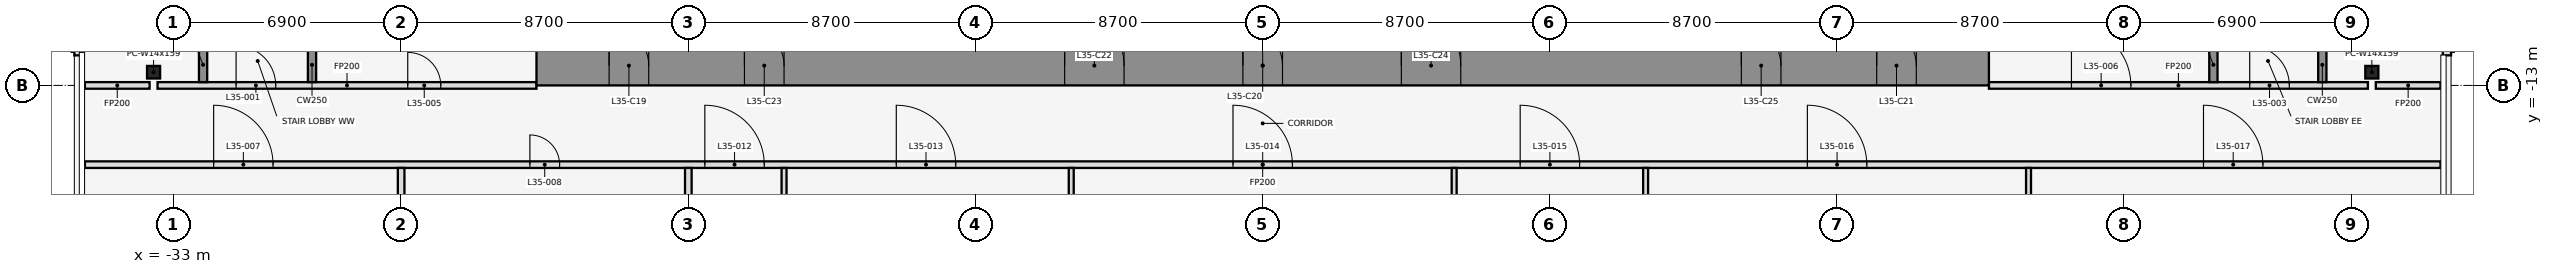
"""IFC4 building model, lengths in metres.
Left out: names, types, materials, properties, quantities, classifications, styles, units other than length and angle.
Written with IfcOpenShell. Run it as: python <this file> out.ifc"""

import sys

from ifc_helpers import new_model, si_unit, direction, frame, frame_2d, origin, origin_2d, place, context, subcontext, project, spatial, rectangle, i_section, extrude, element, fill, save


model = new_model("IFC4")
c1 = context("Model", 3, precision=1e-05, world=origin(), true_north=direction((0.0, 1.0)))
c2 = subcontext(c1, "Body", "Model", "MODEL_VIEW")
j1 = project(units=[si_unit("LENGTHUNIT", "METRE"), si_unit("PLANEANGLEUNIT", "RADIAN")], contexts=[c1])
p1 = place(None, origin())
s1 = spatial("IfcSite", under=j1, at=p1, CompositionType="ELEMENT")
p2 = place(p1, origin())
s2 = spatial("IfcBuilding", under=s1, at=p2, CompositionType="ELEMENT")
p3 = place(p2, frame((0.0, 0.0, 160.9)))
s3 = spatial("IfcBuildingStorey", under=s2, at=p3, CompositionType="ELEMENT", Elevation=160.9)
for number, where, z_axis, x_axis in (
    (1, (-33.6, -12.6, 0.0), (0.0, 0.0, 1.0), (1.0, 0.0, 0.0)),
    (2, (33.6, -12.6, 0.0), (0.0, 0.0, 1.0), (1.0, 0.0, 0.0)),
):
    element("IfcColumn", number, at=place(p3, frame(where, z_axis=z_axis, x_axis=x_axis)), inside=s3, PredefinedType="COLUMN", context=c2, shape_type="SweptSolid", body=[
        extrude(i_section(OverallWidth=0.396, OverallDepth=0.381, WebThickness=0.019, FlangeThickness=0.03, at=origin_2d()), origin(), (0.0, 0.0, 1.0), 4.1),
    ])
for number, where, z_axis, x_axis in (
    (3, (-35.875, -3.0, 0.0), (0.0, 0.0, 1.0), (0.0, -1.0, 0.0)),
    (4, (35.875, -12.09, 0.0), (0.0, 0.0, 1.0), (0.0, 1.0, 0.0)),
):
    element("IfcWall", number, at=place(p3, frame(where, z_axis=z_axis, x_axis=x_axis)), inside=s3, PredefinedType="STANDARD", context=c2, shape_type="SweptSolid", body=[
        extrude(rectangle(XDim=9.09, YDim=0.25, at=frame_2d((4.545, 0.0))), origin(), (0.0, 0.0, 1.0), 3.95),
    ])
p4 = place(p3, frame((-35.68, -15.4, 0.0), z_axis=(0.0, 0.0, 1.0), x_axis=(1.0, 0.0, 0.0)))
e5 = element("IfcWall", 5, at=p4, inside=s3, PredefinedType="PARTITIONING", context=c2, shape_type="SweptSolid", body=[
    extrude(rectangle(XDim=71.36, YDim=0.2, at=frame_2d((35.68, 0.0))), origin(), (0.0, 0.0, 1.0), 2.841),
])
p5 = place(p4, frame((3.9, 0.0, 0.0)))
e6 = element("IfcOpeningElement", 6, at=p5, cuts=e5, PredefinedType="OPENING", context=c2, shape_type="SweptSolid", body=[
    extrude(rectangle(XDim=1.8, YDim=2.1, at=frame_2d((0.9, 1.05))), frame((0.0, 0.112, 0.0), z_axis=(0.0, -1.0, 0.0), x_axis=(1.0, 0.0, 0.0)), (0.0, 0.0, 1.0), 0.224),
])
p6 = place(p4, frame((13.48, 0.0, 0.0)))
e7 = element("IfcOpeningElement", 7, at=p6, cuts=e5, PredefinedType="OPENING", context=c2, shape_type="SweptSolid", body=[
    extrude(rectangle(XDim=0.9, YDim=2.1, at=frame_2d((0.45, 1.05))), frame((0.0, 0.112, 0.0), z_axis=(0.0, -1.0, 0.0), x_axis=(1.0, 0.0, 0.0)), (0.0, 0.0, 1.0), 0.224),
])
p7 = place(p4, frame((18.78, 0.0, 0.0)))
e8 = element("IfcOpeningElement", 8, at=p7, cuts=e5, PredefinedType="OPENING", context=c2, shape_type="SweptSolid", body=[
    extrude(rectangle(XDim=1.8, YDim=2.1, at=frame_2d((0.9, 1.05))), frame((0.0, 0.112, 0.0), z_axis=(0.0, -1.0, 0.0), x_axis=(1.0, 0.0, 0.0)), (0.0, 0.0, 1.0), 0.224),
])
p8 = place(p4, frame((24.58, 0.0, 0.0)))
e9 = element("IfcOpeningElement", 9, at=p8, cuts=e5, PredefinedType="OPENING", context=c2, shape_type="SweptSolid", body=[
    extrude(rectangle(XDim=1.8, YDim=2.1, at=frame_2d((0.9, 1.05))), frame((0.0, 0.112, 0.0), z_axis=(0.0, -1.0, 0.0), x_axis=(1.0, 0.0, 0.0)), (0.0, 0.0, 1.0), 0.224),
])
p9 = place(p4, frame((34.78, 0.0, 0.0)))
e10 = element("IfcOpeningElement", 10, at=p9, cuts=e5, PredefinedType="OPENING", context=c2, shape_type="SweptSolid", body=[
    extrude(rectangle(XDim=1.8, YDim=2.1, at=frame_2d((0.9, 1.05))), frame((0.0, 0.112, 0.0), z_axis=(0.0, -1.0, 0.0), x_axis=(1.0, 0.0, 0.0)), (0.0, 0.0, 1.0), 0.224),
])
p10 = place(p4, frame((43.48, 0.0, 0.0)))
e11 = element("IfcOpeningElement", 11, at=p10, cuts=e5, PredefinedType="OPENING", context=c2, shape_type="SweptSolid", body=[
    extrude(rectangle(XDim=1.8, YDim=2.1, at=frame_2d((0.9, 1.05))), frame((0.0, 0.112, 0.0), z_axis=(0.0, -1.0, 0.0), x_axis=(1.0, 0.0, 0.0)), (0.0, 0.0, 1.0), 0.224),
])
p11 = place(p4, frame((52.18, 0.0, 0.0)))
e12 = element("IfcOpeningElement", 12, at=p11, cuts=e5, PredefinedType="OPENING", context=c2, shape_type="SweptSolid", body=[
    extrude(rectangle(XDim=1.8, YDim=2.1, at=frame_2d((0.9, 1.05))), frame((0.0, 0.112, 0.0), z_axis=(0.0, -1.0, 0.0), x_axis=(1.0, 0.0, 0.0)), (0.0, 0.0, 1.0), 0.224),
])
p12 = place(p4, frame((64.18, 0.0, 0.0)))
e13 = element("IfcOpeningElement", 13, at=p12, cuts=e5, PredefinedType="OPENING", context=c2, shape_type="SweptSolid", body=[
    extrude(rectangle(XDim=1.8, YDim=2.1, at=frame_2d((0.9, 1.05))), frame((0.0, 0.112, 0.0), z_axis=(0.0, -1.0, 0.0), x_axis=(1.0, 0.0, 0.0)), (0.0, 0.0, 1.0), 0.224),
])
p13 = place(p3, frame((-35.68, -13.0, 0.0), z_axis=(0.0, 0.0, 1.0), x_axis=(1.0, 0.0, 0.0)))
e14 = element("IfcWall", 14, at=p13, inside=s3, PredefinedType="PARTITIONING", context=c2, shape_type="SweptSolid", body=[
    extrude(rectangle(XDim=1.96, YDim=0.2, at=frame_2d((0.98, 0.0))), origin(), (0.0, 0.0, 1.0), 2.841),
])
p14 = place(p3, frame((-33.48, -13.0, 0.0), z_axis=(0.0, 0.0, 1.0), x_axis=(1.0, 0.0, 0.0)))
e15 = element("IfcWall", 15, at=p14, inside=s3, PredefinedType="PARTITIONING", context=c2, shape_type="SweptSolid", body=[
    extrude(rectangle(XDim=11.48, YDim=0.2, at=frame_2d((5.74, 0.0))), origin(), (0.0, 0.0, 1.0), 2.841),
])
p15 = place(p14, frame((2.38, 0.0, 0.0)))
e16 = element("IfcOpeningElement", 16, at=p15, cuts=e15, PredefinedType="OPENING", context=c2, shape_type="SweptSolid", body=[
    extrude(rectangle(XDim=1.2, YDim=2.1, at=frame_2d((0.6, 1.05))), frame((0.0, 0.112, 0.0), z_axis=(0.0, -1.0, 0.0), x_axis=(1.0, 0.0, 0.0)), (0.0, 0.0, 1.0), 0.224),
])
p16 = place(p14, frame((7.58, 0.0, 0.0)))
e17 = element("IfcOpeningElement", 17, at=p16, cuts=e15, PredefinedType="OPENING", context=c2, shape_type="SweptSolid", body=[
    extrude(rectangle(XDim=1.0, YDim=2.1, at=frame_2d((0.5, 1.05))), frame((0.0, 0.112, 0.0), z_axis=(0.0, -1.0, 0.0), x_axis=(1.0, 0.0, 0.0)), (0.0, 0.0, 1.0), 0.224),
])
p17 = place(p3, frame((22.0, -13.0, 0.0), z_axis=(0.0, 0.0, 1.0), x_axis=(1.0, 0.0, 0.0)))
e18 = element("IfcWall", 18, at=p17, inside=s3, PredefinedType="PARTITIONING", context=c2, shape_type="SweptSolid", body=[
    extrude(rectangle(XDim=11.48, YDim=0.2, at=frame_2d((5.74, 0.0))), origin(), (0.0, 0.0, 1.0), 2.841),
])
p18 = place(p17, frame((7.9, 0.0, 0.0)))
e19 = element("IfcOpeningElement", 19, at=p18, cuts=e18, PredefinedType="OPENING", context=c2, shape_type="SweptSolid", body=[
    extrude(rectangle(XDim=1.2, YDim=2.1, at=frame_2d((0.6, 1.05))), frame((0.0, 0.112, 0.0), z_axis=(0.0, -1.0, 0.0), x_axis=(1.0, 0.0, 0.0)), (0.0, 0.0, 1.0), 0.224),
])
p19 = place(p17, frame((2.5, 0.0, 0.0)))
e20 = element("IfcOpeningElement", 20, at=p19, cuts=e18, PredefinedType="OPENING", context=c2, shape_type="SweptSolid", body=[
    extrude(rectangle(XDim=1.8, YDim=2.1, at=frame_2d((0.9, 1.05))), frame((0.0, 0.112, 0.0), z_axis=(0.0, -1.0, 0.0), x_axis=(1.0, 0.0, 0.0)), (0.0, 0.0, 1.0), 0.224),
])
p20 = place(p3, frame((33.72, -13.0, 0.0), z_axis=(0.0, 0.0, 1.0), x_axis=(1.0, 0.0, 0.0)))
e21 = element("IfcWall", 21, at=p20, inside=s3, PredefinedType="PARTITIONING", context=c2, shape_type="SweptSolid", body=[
    extrude(rectangle(XDim=1.96, YDim=0.2, at=frame_2d((0.98, 0.0))), origin(), (0.0, 0.0, 1.0), 2.841),
])
for number, where, z_axis, x_axis in (
    (22, (-32.1, -12.9, 0.0), (0.0, 0.0, 1.0), (0.0, 1.0, 0.0)),
    (23, (-28.8, -12.9, 0.0), (0.0, 0.0, 1.0), (0.0, 1.0, 0.0)),
):
    element("IfcWall", number, at=place(p3, frame(where, z_axis=z_axis, x_axis=x_axis)), inside=s3, PredefinedType="SHEAR", context=c2, shape_type="SweptSolid", body=[
        extrude(rectangle(XDim=1.05, YDim=0.25, at=frame_2d((0.525, 0.0))), origin(), (0.0, 0.0, 1.0), 4.1),
    ])
p21 = place(p3, frame((-26.1, -34.71, 0.0), z_axis=(0.0, 0.0, 1.0), x_axis=(0.0, 1.0, 0.0)))
e24 = element("IfcWall", 24, at=p21, inside=s3, PredefinedType="PARTITIONING", context=c2, shape_type="SweptSolid", body=[
    extrude(rectangle(XDim=19.21, YDim=0.2, at=frame_2d((9.605, 0.0))), origin(), (0.0, 0.0, 1.0), 2.841),
])
p22 = place(p3, frame((-17.4, -21.725, 0.0), z_axis=(0.0, 0.0, 1.0), x_axis=(0.0, 1.0, 0.0)))
e25 = element("IfcWall", 25, at=p22, inside=s3, PredefinedType="PARTITIONING", context=c2, shape_type="SweptSolid", body=[
    extrude(rectangle(XDim=6.225, YDim=0.2, at=frame_2d((3.113, 0.0))), origin(), (0.0, 0.0, 1.0), 2.841),
])
p23 = place(p3, frame((-14.5, -33.121, 0.0), z_axis=(0.0, 0.0, 1.0), x_axis=(0.0, 1.0, 0.0)))
e26 = element("IfcWall", 26, at=p23, inside=s3, PredefinedType="PARTITIONING", context=c2, shape_type="SweptSolid", body=[
    extrude(rectangle(XDim=17.621, YDim=0.15, at=frame_2d((8.811, 0.0))), origin(), (0.0, 0.0, 1.0), 2.841),
])
for number, where, z_axis, x_axis in (
    (27, (-5.8, -37.43, 0.0), (0.0, 0.0, 1.0), (0.0, 1.0, 0.0)),
    (28, (5.8, -37.43, 0.0), (0.0, 0.0, 1.0), (0.0, 1.0, 0.0)),
):
    element("IfcWall", number, at=place(p3, frame(where, z_axis=z_axis, x_axis=x_axis)), inside=s3, PredefinedType="PARTITIONING", context=c2, shape_type="SweptSolid", body=[
        extrude(rectangle(XDim=21.93, YDim=0.15, at=frame_2d((10.965, 0.0))), origin(), (0.0, 0.0, 1.0), 2.841),
    ])
p24 = place(p3, frame((11.6, -34.599, 0.0), z_axis=(0.0, 0.0, 1.0), x_axis=(0.0, 1.0, 0.0)))
e29 = element("IfcWall", 29, at=p24, inside=s3, PredefinedType="PARTITIONING", context=c2, shape_type="SweptSolid", body=[
    extrude(rectangle(XDim=19.099, YDim=0.15, at=frame_2d((9.55, 0.0))), origin(), (0.0, 0.0, 1.0), 2.841),
])
p25 = place(p3, frame((23.2, -34.71, 0.0), z_axis=(0.0, 0.0, 1.0), x_axis=(0.0, 1.0, 0.0)))
e30 = element("IfcWall", 30, at=p25, inside=s3, PredefinedType="PARTITIONING", context=c2, shape_type="SweptSolid", body=[
    extrude(rectangle(XDim=19.21, YDim=0.15, at=frame_2d((9.605, 0.0))), origin(), (0.0, 0.0, 1.0), 2.841),
])
for number, where, z_axis, x_axis in (
    (31, (28.8, -12.9, 0.0), (0.0, 0.0, 1.0), (0.0, 1.0, 0.0)),
    (32, (32.1, -12.9, 0.0), (0.0, 0.0, 1.0), (0.0, 1.0, 0.0)),
):
    element("IfcWall", number, at=place(p3, frame(where, z_axis=z_axis, x_axis=x_axis)), inside=s3, PredefinedType="SHEAR", context=c2, shape_type="SweptSolid", body=[
        extrude(rectangle(XDim=1.05, YDim=0.25, at=frame_2d((0.525, 0.0))), origin(), (0.0, 0.0, 1.0), 4.1),
    ])
p26 = place(p3, frame((-22.0, -12.4, 0.0), z_axis=(0.0, 0.0, 1.0), x_axis=(1.0, 0.0, 0.0)))
e33 = element("IfcWall", 33, at=p26, inside=s3, PredefinedType="SHEAR", context=c2, shape_type="SweptSolid", body=[
    extrude(rectangle(XDim=44.0, YDim=1.2, at=frame_2d((22.0, 0.0))), origin(), (0.0, 0.0, 1.0), 4.1),
])
p27 = place(p26, frame((2.2, 0.0, 0.0)))
e34 = element("IfcOpeningElement", 34, at=p27, cuts=e33, PredefinedType="OPENING", context=c2, shape_type="SweptSolid", body=[
    extrude(rectangle(XDim=1.2, YDim=2.1, at=frame_2d((0.6, 1.05))), frame((0.0, 0.612, 0.0), z_axis=(0.0, -1.0, 0.0), x_axis=(1.0, 0.0, 0.0)), (0.0, 0.0, 1.0), 1.224),
])
p28 = place(p26, frame((21.4, 0.0, 0.0)))
e35 = element("IfcOpeningElement", 35, at=p28, cuts=e33, PredefinedType="OPENING", context=c2, shape_type="SweptSolid", body=[
    extrude(rectangle(XDim=1.2, YDim=2.1, at=frame_2d((0.6, 1.05))), frame((0.0, 0.612, 0.0), z_axis=(0.0, -1.0, 0.0), x_axis=(1.0, 0.0, 0.0)), (0.0, 0.0, 1.0), 1.224),
])
p29 = place(p26, frame((40.6, 0.0, 0.0)))
e36 = element("IfcOpeningElement", 36, at=p29, cuts=e33, PredefinedType="OPENING", context=c2, shape_type="SweptSolid", body=[
    extrude(rectangle(XDim=1.2, YDim=2.1, at=frame_2d((0.6, 1.05))), frame((0.0, 0.612, 0.0), z_axis=(0.0, -1.0, 0.0), x_axis=(1.0, 0.0, 0.0)), (0.0, 0.0, 1.0), 1.224),
])
p30 = place(p26, frame((16.0, 0.0, 0.0)))
e37 = element("IfcOpeningElement", 37, at=p30, cuts=e33, PredefinedType="OPENING", context=c2, shape_type="SweptSolid", body=[
    extrude(rectangle(XDim=1.8, YDim=2.1, at=frame_2d((0.9, 1.05))), frame((0.0, 0.612, 0.0), z_axis=(0.0, -1.0, 0.0), x_axis=(1.0, 0.0, 0.0)), (0.0, 0.0, 1.0), 1.224),
])
p31 = place(p26, frame((6.3, 0.0, 0.0)))
e38 = element("IfcOpeningElement", 38, at=p31, cuts=e33, PredefinedType="OPENING", context=c2, shape_type="SweptSolid", body=[
    extrude(rectangle(XDim=1.2, YDim=2.1, at=frame_2d((0.6, 1.05))), frame((0.0, 0.612, 0.0), z_axis=(0.0, -1.0, 0.0), x_axis=(1.0, 0.0, 0.0)), (0.0, 0.0, 1.0), 1.224),
])
p32 = place(p26, frame((26.2, 0.0, 0.0)))
e39 = element("IfcOpeningElement", 39, at=p32, cuts=e33, PredefinedType="OPENING", context=c2, shape_type="SweptSolid", body=[
    extrude(rectangle(XDim=1.8, YDim=2.1, at=frame_2d((0.9, 1.05))), frame((0.0, 0.612, 0.0), z_axis=(0.0, -1.0, 0.0), x_axis=(1.0, 0.0, 0.0)), (0.0, 0.0, 1.0), 1.224),
])
p33 = place(p26, frame((36.5, 0.0, 0.0)))
e40 = element("IfcOpeningElement", 40, at=p33, cuts=e33, PredefinedType="OPENING", context=c2, shape_type="SweptSolid", body=[
    extrude(rectangle(XDim=1.2, YDim=2.1, at=frame_2d((0.6, 1.05))), frame((0.0, 0.612, 0.0), z_axis=(0.0, -1.0, 0.0), x_axis=(1.0, 0.0, 0.0)), (0.0, 0.0, 1.0), 1.224),
])
p34 = place(p15, origin())
e41 = element("IfcDoor", 41, at=p34, inside=s3, OperationType="SINGLE_SWING_LEFT", PredefinedType="DOOR", context=c2, shape_type="SweptSolid", body=[
    extrude(rectangle(XDim=1.2, YDim=2.1, at=frame_2d((0.6, 1.05))), frame((0.0, 0.025, 0.0), z_axis=(0.0, -1.0, 0.0), x_axis=(1.0, 0.0, 0.0)), (0.0, 0.0, 1.0), 0.05),
])
fill(e16, e41)
p35 = place(p18, origin())
e42 = element("IfcDoor", 42, at=p35, inside=s3, OperationType="SINGLE_SWING_RIGHT", PredefinedType="DOOR", context=c2, shape_type="SweptSolid", body=[
    extrude(rectangle(XDim=1.2, YDim=2.1, at=frame_2d((0.6, 1.05))), frame((0.0, 0.025, 0.0), z_axis=(0.0, -1.0, 0.0), x_axis=(1.0, 0.0, 0.0)), (0.0, 0.0, 1.0), 0.05),
])
fill(e19, e42)
p36 = place(p16, origin())
e43 = element("IfcDoor", 43, at=p36, inside=s3, OperationType="SINGLE_SWING_LEFT", PredefinedType="DOOR", context=c2, shape_type="SweptSolid", body=[
    extrude(rectangle(XDim=1.0, YDim=2.1, at=frame_2d((0.5, 1.05))), frame((0.0, 0.025, 0.0), z_axis=(0.0, -1.0, 0.0), x_axis=(1.0, 0.0, 0.0)), (0.0, 0.0, 1.0), 0.05),
])
fill(e17, e43)
p37 = place(p19, origin())
e44 = element("IfcDoor", 44, at=p37, inside=s3, OperationType="SINGLE_SWING_LEFT", PredefinedType="DOOR", context=c2, shape_type="SweptSolid", body=[
    extrude(rectangle(XDim=1.8, YDim=2.1, at=frame_2d((0.9, 1.05))), frame((0.0, 0.025, 0.0), z_axis=(0.0, -1.0, 0.0), x_axis=(1.0, 0.0, 0.0)), (0.0, 0.0, 1.0), 0.05),
])
fill(e20, e44)
p38 = place(p5, origin())
e45 = element("IfcDoor", 45, at=p38, inside=s3, OperationType="SINGLE_SWING_LEFT", PredefinedType="DOOR", context=c2, shape_type="SweptSolid", body=[
    extrude(rectangle(XDim=1.8, YDim=2.1, at=frame_2d((0.9, 1.05))), frame((0.0, 0.025, 0.0), z_axis=(0.0, -1.0, 0.0), x_axis=(1.0, 0.0, 0.0)), (0.0, 0.0, 1.0), 0.05),
])
fill(e6, e45)
p39 = place(p6, frame((0.9, 0.0, 0.0), z_axis=(0.0, 0.0, 1.0), x_axis=(-1.0, 0.0, 0.0)))
e46 = element("IfcDoor", 46, at=p39, inside=s3, OperationType="SINGLE_SWING_RIGHT", PredefinedType="DOOR", context=c2, shape_type="SweptSolid", body=[
    extrude(rectangle(XDim=0.9, YDim=2.1, at=frame_2d((0.45, 1.05))), frame((0.0, 0.025, 0.0), z_axis=(0.0, -1.0, 0.0), x_axis=(1.0, 0.0, 0.0)), (0.0, 0.0, 1.0), 0.05),
])
fill(e7, e46)
p40 = place(p7, origin())
e47 = element("IfcDoor", 47, at=p40, inside=s3, OperationType="SINGLE_SWING_LEFT", PredefinedType="DOOR", context=c2, shape_type="SweptSolid", body=[
    extrude(rectangle(XDim=1.8, YDim=2.1, at=frame_2d((0.9, 1.05))), frame((0.0, 0.025, 0.0), z_axis=(0.0, -1.0, 0.0), x_axis=(1.0, 0.0, 0.0)), (0.0, 0.0, 1.0), 0.05),
])
fill(e8, e47)
p41 = place(p8, origin())
e48 = element("IfcDoor", 48, at=p41, inside=s3, OperationType="SINGLE_SWING_LEFT", PredefinedType="DOOR", context=c2, shape_type="SweptSolid", body=[
    extrude(rectangle(XDim=1.8, YDim=2.1, at=frame_2d((0.9, 1.05))), frame((0.0, 0.025, 0.0), z_axis=(0.0, -1.0, 0.0), x_axis=(1.0, 0.0, 0.0)), (0.0, 0.0, 1.0), 0.05),
])
fill(e9, e48)
p42 = place(p9, origin())
e49 = element("IfcDoor", 49, at=p42, inside=s3, OperationType="SINGLE_SWING_LEFT", PredefinedType="DOOR", context=c2, shape_type="SweptSolid", body=[
    extrude(rectangle(XDim=1.8, YDim=2.1, at=frame_2d((0.9, 1.05))), frame((0.0, 0.025, 0.0), z_axis=(0.0, -1.0, 0.0), x_axis=(1.0, 0.0, 0.0)), (0.0, 0.0, 1.0), 0.05),
])
fill(e10, e49)
p43 = place(p10, origin())
e50 = element("IfcDoor", 50, at=p43, inside=s3, OperationType="SINGLE_SWING_LEFT", PredefinedType="DOOR", context=c2, shape_type="SweptSolid", body=[
    extrude(rectangle(XDim=1.8, YDim=2.1, at=frame_2d((0.9, 1.05))), frame((0.0, 0.025, 0.0), z_axis=(0.0, -1.0, 0.0), x_axis=(1.0, 0.0, 0.0)), (0.0, 0.0, 1.0), 0.05),
])
fill(e11, e50)
p44 = place(p11, origin())
e51 = element("IfcDoor", 51, at=p44, inside=s3, OperationType="SINGLE_SWING_LEFT", PredefinedType="DOOR", context=c2, shape_type="SweptSolid", body=[
    extrude(rectangle(XDim=1.8, YDim=2.1, at=frame_2d((0.9, 1.05))), frame((0.0, 0.025, 0.0), z_axis=(0.0, -1.0, 0.0), x_axis=(1.0, 0.0, 0.0)), (0.0, 0.0, 1.0), 0.05),
])
fill(e12, e51)
p45 = place(p12, origin())
e52 = element("IfcDoor", 52, at=p45, inside=s3, OperationType="SINGLE_SWING_LEFT", PredefinedType="DOOR", context=c2, shape_type="SweptSolid", body=[
    extrude(rectangle(XDim=1.8, YDim=2.1, at=frame_2d((0.9, 1.05))), frame((0.0, 0.025, 0.0), z_axis=(0.0, -1.0, 0.0), x_axis=(1.0, 0.0, 0.0)), (0.0, 0.0, 1.0), 0.05),
])
fill(e13, e52)
p46 = place(p27, frame((1.2, 0.0, 0.0), z_axis=(0.0, 0.0, 1.0), x_axis=(-1.0, 0.0, 0.0)))
e53 = element("IfcDoor", 53, at=p46, inside=s3, OperationType="SINGLE_SWING_RIGHT", PredefinedType="DOOR", context=c2, shape_type="SweptSolid", body=[
    extrude(rectangle(XDim=1.2, YDim=2.1, at=frame_2d((0.6, 1.05))), frame((0.0, 0.025, 0.0), z_axis=(0.0, -1.0, 0.0), x_axis=(1.0, 0.0, 0.0)), (0.0, 0.0, 1.0), 0.05),
])
fill(e34, e53)
p47 = place(p28, frame((1.2, 0.0, 0.0), z_axis=(0.0, 0.0, 1.0), x_axis=(-1.0, 0.0, 0.0)))
e54 = element("IfcDoor", 54, at=p47, inside=s3, OperationType="SINGLE_SWING_RIGHT", PredefinedType="DOOR", context=c2, shape_type="SweptSolid", body=[
    extrude(rectangle(XDim=1.2, YDim=2.1, at=frame_2d((0.6, 1.05))), frame((0.0, 0.025, 0.0), z_axis=(0.0, -1.0, 0.0), x_axis=(1.0, 0.0, 0.0)), (0.0, 0.0, 1.0), 0.05),
])
fill(e35, e54)
p48 = place(p29, frame((1.2, 0.0, 0.0), z_axis=(0.0, 0.0, 1.0), x_axis=(-1.0, 0.0, 0.0)))
e55 = element("IfcDoor", 55, at=p48, inside=s3, OperationType="SINGLE_SWING_RIGHT", PredefinedType="DOOR", context=c2, shape_type="SweptSolid", body=[
    extrude(rectangle(XDim=1.2, YDim=2.1, at=frame_2d((0.6, 1.05))), frame((0.0, 0.025, 0.0), z_axis=(0.0, -1.0, 0.0), x_axis=(1.0, 0.0, 0.0)), (0.0, 0.0, 1.0), 0.05),
])
fill(e36, e55)
p49 = place(p30, origin())
e56 = element("IfcDoor", 56, at=p49, inside=s3, OperationType="SINGLE_SWING_LEFT", PredefinedType="DOOR", context=c2, shape_type="SweptSolid", body=[
    extrude(rectangle(XDim=1.8, YDim=2.1, at=frame_2d((0.9, 1.05))), frame((0.0, 0.025, 0.0), z_axis=(0.0, -1.0, 0.0), x_axis=(1.0, 0.0, 0.0)), (0.0, 0.0, 1.0), 0.05),
])
fill(e37, e56)
p50 = place(p31, frame((1.2, 0.0, 0.0), z_axis=(0.0, 0.0, 1.0), x_axis=(-1.0, 0.0, 0.0)))
e57 = element("IfcDoor", 57, at=p50, inside=s3, OperationType="SINGLE_SWING_RIGHT", PredefinedType="DOOR", context=c2, shape_type="SweptSolid", body=[
    extrude(rectangle(XDim=1.2, YDim=2.1, at=frame_2d((0.6, 1.05))), frame((0.0, 0.025, 0.0), z_axis=(0.0, -1.0, 0.0), x_axis=(1.0, 0.0, 0.0)), (0.0, 0.0, 1.0), 0.05),
])
fill(e38, e57)
p51 = place(p32, origin())
e58 = element("IfcDoor", 58, at=p51, inside=s3, OperationType="SINGLE_SWING_LEFT", PredefinedType="DOOR", context=c2, shape_type="SweptSolid", body=[
    extrude(rectangle(XDim=1.8, YDim=2.1, at=frame_2d((0.9, 1.05))), frame((0.0, 0.025, 0.0), z_axis=(0.0, -1.0, 0.0), x_axis=(1.0, 0.0, 0.0)), (0.0, 0.0, 1.0), 0.05),
])
fill(e39, e58)
p52 = place(p33, frame((1.2, 0.0, 0.0), z_axis=(0.0, 0.0, 1.0), x_axis=(-1.0, 0.0, 0.0)))
e59 = element("IfcDoor", 59, at=p52, inside=s3, OperationType="SINGLE_SWING_RIGHT", PredefinedType="DOOR", context=c2, shape_type="SweptSolid", body=[
    extrude(rectangle(XDim=1.2, YDim=2.1, at=frame_2d((0.6, 1.05))), frame((0.0, 0.025, 0.0), z_axis=(0.0, -1.0, 0.0), x_axis=(1.0, 0.0, 0.0)), (0.0, 0.0, 1.0), 0.05),
])
fill(e40, e59)
save(model, sys.argv[1])
